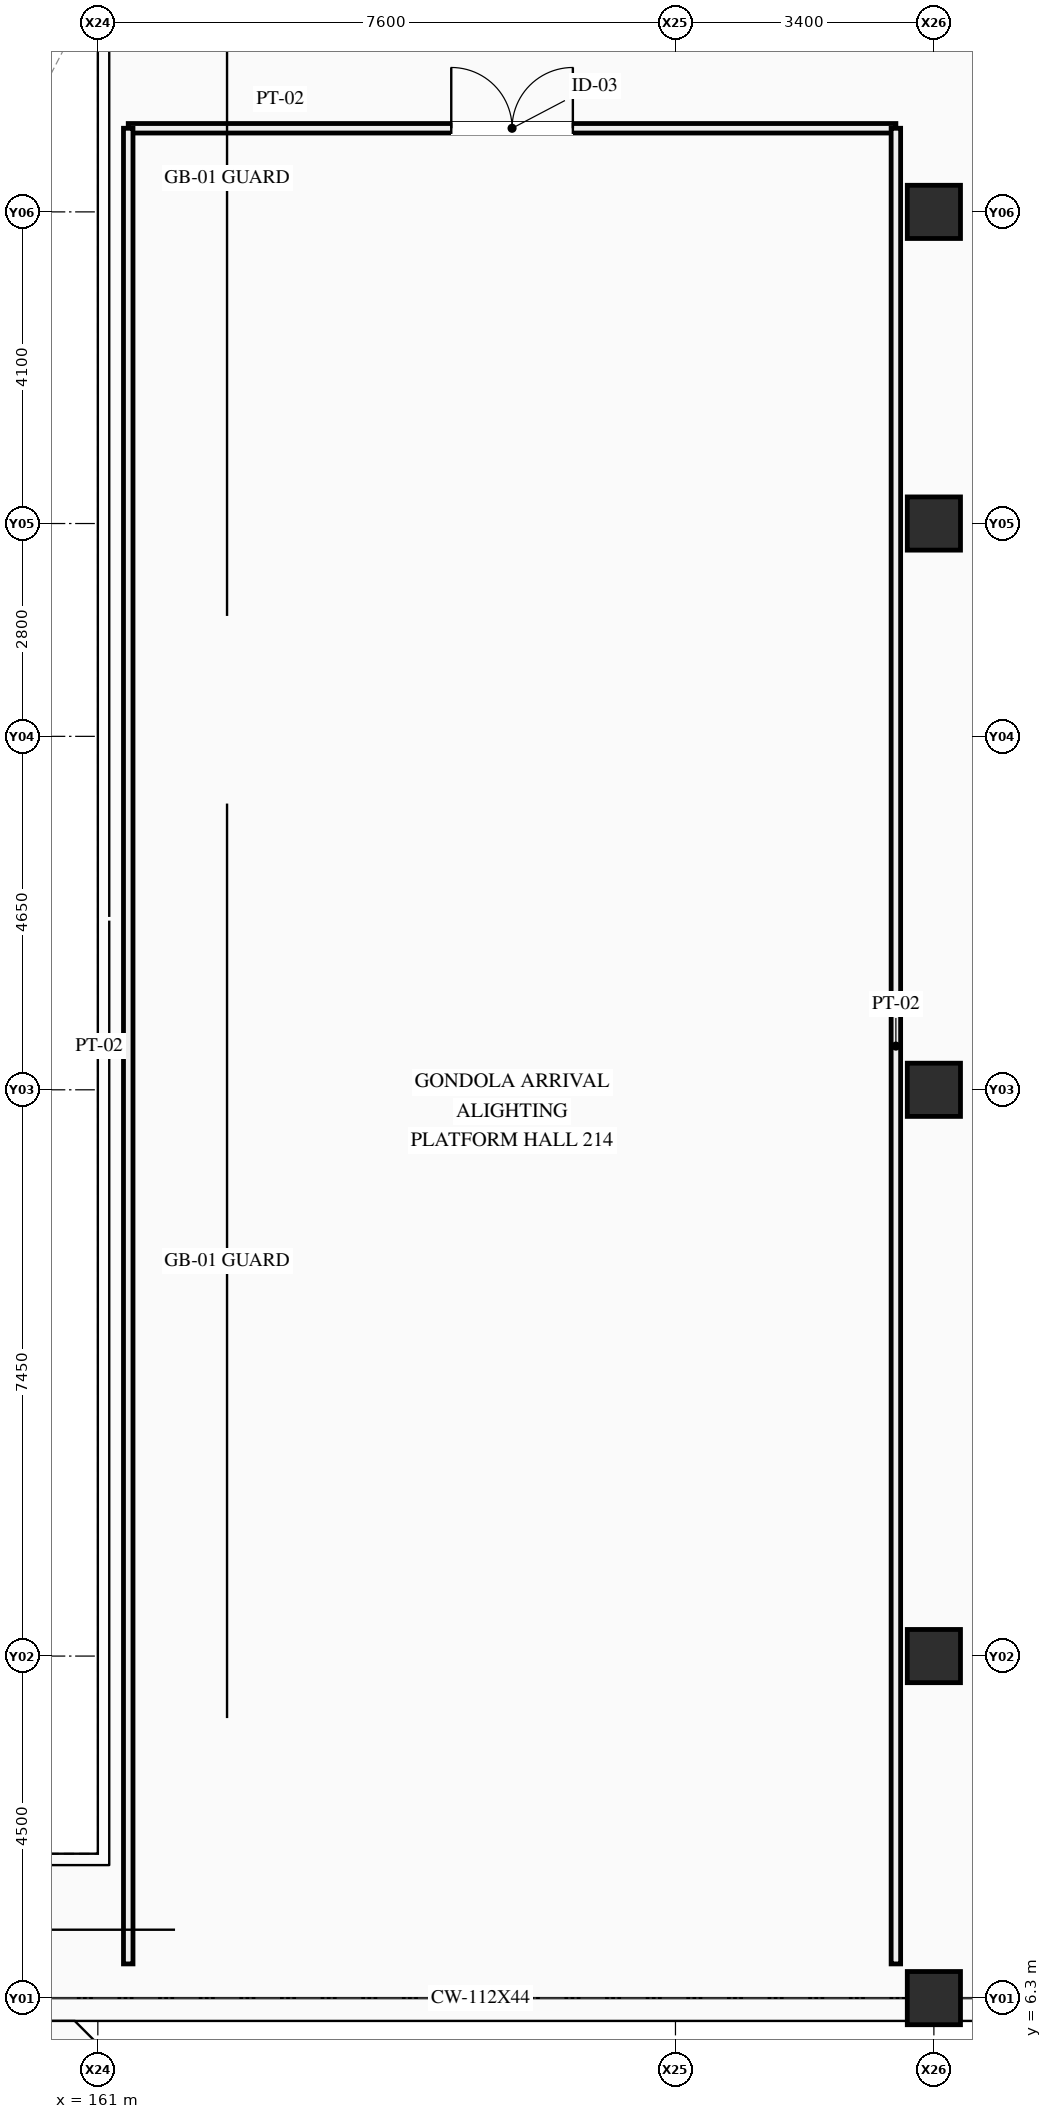
"""IFC4 building model, lengths in metres.
Left out: names, types, materials, properties, quantities, classifications, styles, units other than length and angle.
Written with IfcOpenShell. Run it as: python <this file> out.ifc"""

import sys

from ifc_helpers import new_model, si_unit, direction, frame, frame_2d, origin, origin_2d, place, context, subcontext, project, spatial, rectangle, extrude, element, fill, save


model = new_model("IFC4")
c1 = context("Model", 3, precision=1e-05, world=origin(), true_north=direction((0.0, 1.0)))
c2 = subcontext(c1, "Body", "Model", "MODEL_VIEW")
j1 = project(units=[si_unit("LENGTHUNIT", "METRE"), si_unit("PLANEANGLEUNIT", "RADIAN")], contexts=[c1])
p1 = place(None, origin())
s1 = spatial("IfcSite", under=j1, at=p1, CompositionType="ELEMENT")
p2 = place(p1, origin())
s2 = spatial("IfcBuilding", under=s1, at=p2, CompositionType="ELEMENT")
p3 = place(p2, frame((0.0, 0.0, 9.0)))
s3 = spatial("IfcBuildingStorey", under=s2, at=p3, CompositionType="ELEMENT", Elevation=9.0)
for number, where, z_axis, x_axis in (
    (1, (172.0, 6.3, 0.0), (0.0, 0.0, 1.0), (1.0, 0.0, 0.0)),
    (2, (172.0, 10.8, 0.0), (0.0, 0.0, 1.0), (1.0, 0.0, 0.0)),
    (3, (172.0, 18.25, 0.0), (0.0, 0.0, 1.0), (1.0, 0.0, 0.0)),
    (4, (172.0, 25.7, 0.0), (0.0, 0.0, 1.0), (1.0, 0.0, 0.0)),
    (5, (172.0, 29.8, 0.0), (0.0, 0.0, 1.0), (1.0, 0.0, 0.0)),
):
    element("IfcColumn", number, at=place(p3, frame(where, z_axis=z_axis, x_axis=x_axis)), inside=s3, PredefinedType="COLUMN", context=c2, shape_type="SweptSolid", body=[
        extrude(rectangle(XDim=0.7, YDim=0.7, at=origin_2d()), origin(), (0.0, 0.0, 1.0), 5.4),
    ])
p4 = place(p3, frame((161.4, 30.9, 0.0), z_axis=(0.0, 0.0, 1.0), x_axis=(1.0, 0.0, 0.0)))
e6 = element("IfcWall", 6, at=p4, inside=s3, PredefinedType="PARTITIONING", context=c2, shape_type="SweptSolid", body=[
    extrude(rectangle(XDim=10.1, YDim=0.125, at=frame_2d((5.05, 0.0))), origin(), (0.0, 0.0, 1.0), 3.3),
])
p5 = place(p4, frame((4.25, 0.0, 0.0)))
e7 = element("IfcOpeningElement", 7, at=p5, cuts=e6, PredefinedType="OPENING", context=c2, shape_type="SweptSolid", body=[
    extrude(rectangle(XDim=1.6, YDim=2.2, at=frame_2d((0.8, 1.1))), frame((0.0, 0.073, 0.0), z_axis=(0.0, -1.0, 0.0), x_axis=(1.0, 0.0, 0.0)), (0.0, 0.0, 1.0), 0.145),
])
for number, where, z_axis, x_axis in (
    (8, (161.4, 6.75, 0.0), (0.0, 0.0, 1.0), (0.0, 1.0, 0.0)),
    (9, (171.5, 6.75, 0.0), (0.0, 0.0, 1.0), (0.0, 1.0, 0.0)),
):
    element("IfcWall", number, at=place(p3, frame(where, z_axis=z_axis, x_axis=x_axis)), inside=s3, PredefinedType="PARTITIONING", context=c2, shape_type="SweptSolid", body=[
        extrude(rectangle(XDim=24.15, YDim=0.125, at=frame_2d((12.075, 0.0))), origin(), (0.0, 0.0, 1.0), 3.3),
    ])
p6 = place(p5, origin())
e10 = element("IfcDoor", 10, at=p6, inside=s3, OperationType="DOUBLE_DOOR_SINGLE_SWING", PredefinedType="DOOR", context=c2, shape_type="SweptSolid", body=[
    extrude(rectangle(XDim=1.6, YDim=2.2, at=frame_2d((0.8, 1.1))), frame((0.0, 0.025, 0.0), z_axis=(0.0, -1.0, 0.0), x_axis=(1.0, 0.0, 0.0)), (0.0, 0.0, 1.0), 0.05),
])
fill(e7, e10)
save(model, sys.argv[1])
